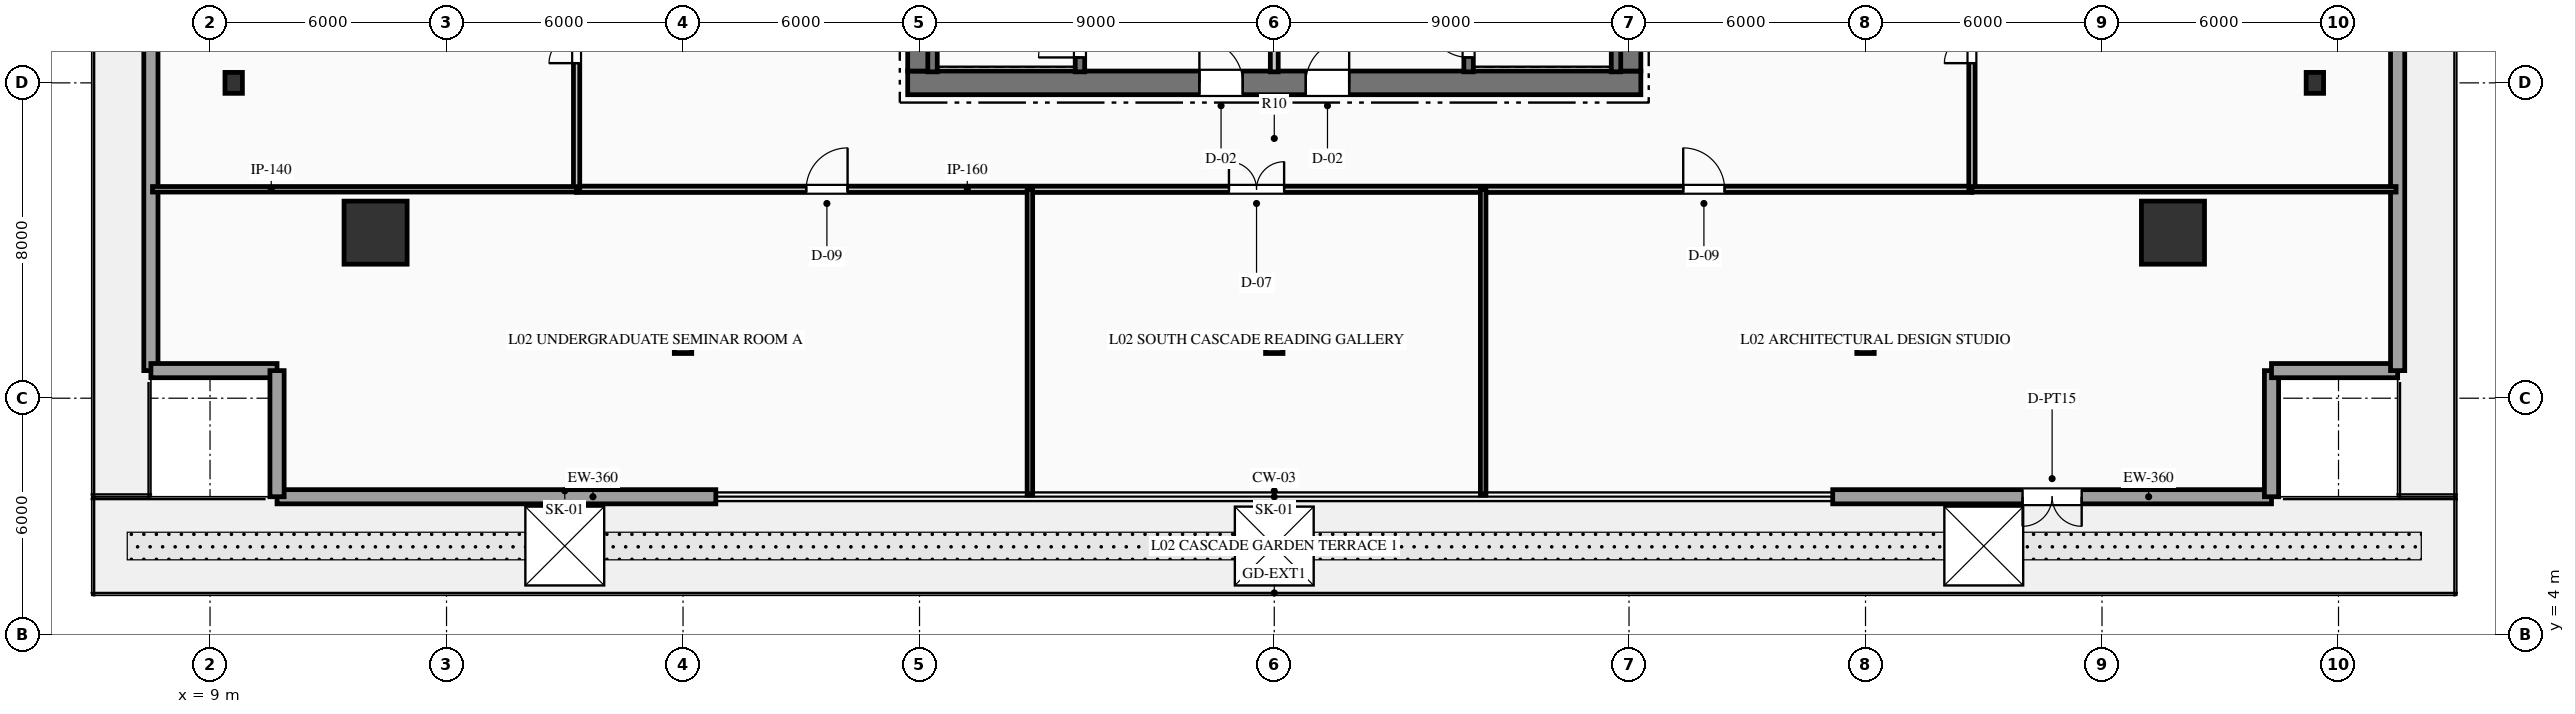
"""IFC4 building model, lengths in metres.
Left out: names, types, materials, properties, quantities, classifications, styles, units other than length and angle.
Written with IfcOpenShell. Run it as: python <this file> out.ifc"""

import sys

from ifc_helpers import new_model, si_unit, direction, frame, frame_2d, origin, origin_2d, place, context, subcontext, project, spatial, rectangle, hollow_rectangle, i_section, extrude, element, fill, save


model = new_model("IFC4")
c1 = context("Model", 3, precision=1e-05, world=origin(), true_north=direction((0.0, 1.0)))
c2 = subcontext(c1, "Body", "Model", "MODEL_VIEW")
j1 = project(units=[si_unit("LENGTHUNIT", "METRE"), si_unit("PLANEANGLEUNIT", "RADIAN")], contexts=[c1])
p1 = place(None, origin())
s1 = spatial("IfcSite", under=j1, at=p1, CompositionType="ELEMENT")
p2 = place(p1, origin())
s2 = spatial("IfcBuilding", under=s1, at=p2, CompositionType="ELEMENT")
p3 = place(p2, frame((0.0, 0.0, 11.4)))
s3 = spatial("IfcBuildingStorey", under=s2, at=p3, CompositionType="ELEMENT", Elevation=11.4)
p4 = place(p3, frame((26.7, 18.0, 0.0), z_axis=(0.0, 0.0, 1.0), x_axis=(1.0, 0.0, 0.0)))
e1 = element("IfcWall", 1, at=p4, inside=s3, PredefinedType="SHEAR", context=c2, shape_type="SweptSolid", body=[
    extrude(rectangle(XDim=18.6, YDim=0.6, at=frame_2d((9.3, 0.0))), origin(), (0.0, 0.0, 1.0), 5.4),
])
p5 = place(p4, frame((7.4, 0.0, 0.0)))
e2 = element("IfcOpeningElement", 2, at=p5, cuts=e1, PredefinedType="OPENING", context=c2, shape_type="SweptSolid", body=[
    extrude(rectangle(XDim=1.1, YDim=2.15, at=frame_2d((0.55, 1.075))), frame((0.0, 0.31, 0.0), z_axis=(0.0, -1.0, 0.0), x_axis=(1.0, 0.0, 0.0)), (0.0, 0.0, 1.0), 0.62),
])
p6 = place(p4, frame((10.1, 0.0, 0.0)))
e3 = element("IfcOpeningElement", 3, at=p6, cuts=e1, PredefinedType="OPENING", context=c2, shape_type="SweptSolid", body=[
    extrude(rectangle(XDim=1.1, YDim=2.15, at=frame_2d((0.55, 1.075))), frame((0.0, 0.31, 0.0), z_axis=(0.0, -1.0, 0.0), x_axis=(1.0, 0.0, 0.0)), (0.0, 0.0, 1.0), 0.62),
])
p7 = place(p3, frame((27.0, 18.3, 0.0), z_axis=(0.0, 0.0, 1.0), x_axis=(0.0, 1.0, 0.0)))
e4 = element("IfcWall", 4, at=p7, inside=s3, PredefinedType="SHEAR", context=c2, shape_type="SweptSolid", body=[
    extrude(rectangle(XDim=15.4, YDim=0.6, at=frame_2d((7.7, 0.0))), origin(), (0.0, 0.0, 1.0), 5.4),
])
p8 = place(p7, frame((9.94, 0.0, 0.0)))
e5 = element("IfcOpeningElement", 5, at=p8, cuts=e4, PredefinedType="OPENING", context=c2, shape_type="SweptSolid", body=[
    extrude(rectangle(XDim=1.4, YDim=2.2, at=frame_2d((0.7, 1.1))), frame((0.0, 0.31, 0.0), z_axis=(0.0, -1.0, 0.0), x_axis=(1.0, 0.0, 0.0)), (0.0, 0.0, 1.0), 0.62),
])
p9 = place(p3, frame((45.0, 18.3, 0.0), z_axis=(0.0, 0.0, 1.0), x_axis=(0.0, 1.0, 0.0)))
e6 = element("IfcWall", 6, at=p9, inside=s3, PredefinedType="SHEAR", context=c2, shape_type="SweptSolid", body=[
    extrude(rectangle(XDim=15.4, YDim=0.6, at=frame_2d((7.7, 0.0))), origin(), (0.0, 0.0, 1.0), 5.4),
])
p10 = place(p9, frame((9.94, 0.0, 0.0)))
e7 = element("IfcOpeningElement", 7, at=p10, cuts=e6, PredefinedType="OPENING", context=c2, shape_type="SweptSolid", body=[
    extrude(rectangle(XDim=1.4, YDim=2.2, at=frame_2d((0.7, 1.1))), frame((0.0, 0.31, 0.0), z_axis=(0.0, -1.0, 0.0), x_axis=(1.0, 0.0, 0.0)), (0.0, 0.0, 1.0), 0.62),
])
p11 = place(p3, frame((31.07, 18.28, 0.0), z_axis=(0.0, 0.0, 1.0), x_axis=(0.0, 1.0, 0.0)))
e8 = element("IfcWall", 8, at=p11, inside=s3, PredefinedType="SHEAR", context=c2, shape_type="SweptSolid", body=[
    extrude(rectangle(XDim=8.26, YDim=0.24, at=frame_2d((4.13, 0.0))), origin(), (0.0, 0.0, 1.0), 5.4),
])
p12 = place(p11, frame((0.365, 0.0, 0.0)))
e9 = element("IfcOpeningElement", 9, at=p12, cuts=e8, PredefinedType="OPENING", context=c2, shape_type="SweptSolid", body=[
    extrude(rectangle(XDim=1.05, YDim=2.15, at=frame_2d((0.525, 1.075))), frame((0.0, 0.13, 0.0), z_axis=(0.0, -1.0, 0.0), x_axis=(1.0, 0.0, 0.0)), (0.0, 0.0, 1.0), 0.26),
])
p13 = place(p3, frame((27.33, 18.28, 0.0), z_axis=(0.0, 0.0, 1.0), x_axis=(0.0, 1.0, 0.0)))
e10 = element("IfcWall", 10, at=p13, inside=s3, PredefinedType="SHEAR", context=c2, shape_type="SweptSolid", body=[
    extrude(rectangle(XDim=8.26, YDim=0.24, at=frame_2d((4.13, 0.0))), origin(), (0.0, 0.0, 1.0), 5.4),
])
p14 = place(p3, frame((40.93, 18.28, 0.0), z_axis=(0.0, 0.0, 1.0), x_axis=(0.0, 1.0, 0.0)))
e11 = element("IfcWall", 11, at=p14, inside=s3, PredefinedType="SHEAR", context=c2, shape_type="SweptSolid", body=[
    extrude(rectangle(XDim=8.26, YDim=0.24, at=frame_2d((4.13, 0.0))), origin(), (0.0, 0.0, 1.0), 5.4),
])
p15 = place(p14, frame((0.365, 0.0, 0.0)))
e12 = element("IfcOpeningElement", 12, at=p15, cuts=e11, PredefinedType="OPENING", context=c2, shape_type="SweptSolid", body=[
    extrude(rectangle(XDim=1.05, YDim=2.15, at=frame_2d((0.525, 1.075))), frame((0.0, 0.13, 0.0), z_axis=(0.0, -1.0, 0.0), x_axis=(1.0, 0.0, 0.0)), (0.0, 0.0, 1.0), 0.26),
])
p16 = place(p3, frame((44.67, 18.28, 0.0), z_axis=(0.0, 0.0, 1.0), x_axis=(0.0, 1.0, 0.0)))
e13 = element("IfcWall", 13, at=p16, inside=s3, PredefinedType="SHEAR", context=c2, shape_type="SweptSolid", body=[
    extrude(rectangle(XDim=8.26, YDim=0.24, at=frame_2d((4.13, 0.0))), origin(), (0.0, 0.0, 1.0), 5.4),
])
for number, where, z_axis, x_axis in (
    (14, (13.2, 14.2, 0.0), (0.0, 0.0, 1.0), (1.0, 0.0, 0.0)),
    (15, (58.8, 14.2, 0.0), (0.0, 0.0, 1.0), (1.0, 0.0, 0.0)),
):
    element("IfcColumn", number, at=place(p3, frame(where, z_axis=z_axis, x_axis=x_axis)), inside=s3, PredefinedType="COLUMN", context=c2, shape_type="SweptSolid", body=[
        extrude(hollow_rectangle(XDim=1.6, YDim=1.6, WallThickness=0.08, at=origin_2d()), origin(), (0.0, 0.0, 1.0), 5.4),
    ])
for number, where, z_axis, x_axis in (
    (16, (9.6, 18.0, 0.0), (0.0, 0.0, 1.0), (1.0, 0.0, 0.0)),
    (17, (62.4, 18.0, 0.0), (0.0, 0.0, 1.0), (1.0, 0.0, 0.0)),
    (18, (21.0, 11.4, 0.0), (0.0, 0.0, 1.0), (1.0, 0.0, 0.0)),
    (19, (51.0, 11.4, 0.0), (0.0, 0.0, 1.0), (1.0, 0.0, 0.0)),
    (20, (36.0, 11.4, 0.0), (0.0, 0.0, 1.0), (1.0, 0.0, 0.0)),
):
    element("IfcColumn", number, at=place(p3, frame(where, z_axis=z_axis, x_axis=x_axis)), inside=s3, PredefinedType="COLUMN", context=c2, shape_type="SweptSolid", body=[
        extrude(i_section(OverallWidth=0.442, OverallDepth=0.531, WebThickness=0.066, FlangeThickness=0.106, at=origin_2d()), origin(), (0.0, 0.0, 1.0), 5.4),
    ])
p17 = place(p3, frame((61.3, 7.5, 0.0), z_axis=(0.0, 0.0, 1.0), x_axis=(-1.0, 0.0, 0.0)))
e21 = element("IfcWall", 21, at=p17, inside=s3, PredefinedType="STANDARD", context=c2, shape_type="SweptSolid", body=[
    extrude(rectangle(XDim=11.132, YDim=0.36, at=frame_2d((5.566, 0.0))), origin(), (0.0, 0.0, 1.0), 5.07),
])
p18 = place(p17, frame((4.816, 0.0, 0.0)))
e22 = element("IfcOpeningElement", 22, at=p18, cuts=e21, PredefinedType="OPENING", context=c2, shape_type="SweptSolid", body=[
    extrude(rectangle(XDim=1.5, YDim=2.25, at=frame_2d((0.75, 1.125))), frame((0.0, 0.19, 0.0), z_axis=(0.0, -1.0, 0.0), x_axis=(1.0, 0.0, 0.0)), (0.0, 0.0, 1.0), 0.38),
])
p19 = place(p3, frame((21.832, 7.5, 0.0), z_axis=(0.0, 0.0, 1.0), x_axis=(-1.0, 0.0, 0.0)))
e23 = element("IfcWall", 23, at=p19, inside=s3, PredefinedType="STANDARD", context=c2, shape_type="SweptSolid", body=[
    extrude(rectangle(XDim=11.132, YDim=0.36, at=frame_2d((5.566, 0.0))), origin(), (0.0, 0.0, 1.0), 5.07),
])
for number, where, z_axis, x_axis in (
    (24, (61.3, 10.7, 0.0), (0.0, 0.0, 1.0), (0.0, -1.0, 0.0)),
    (25, (64.5, 10.7, 0.0), (0.0, 0.0, 1.0), (-1.0, 0.0, 0.0)),
):
    element("IfcWall", number, at=place(p3, frame(where, z_axis=z_axis, x_axis=x_axis)), inside=s3, PredefinedType="STANDARD", context=c2, shape_type="SweptSolid", body=[
        extrude(rectangle(XDim=3.2, YDim=0.36, at=frame_2d((1.6, 0.0))), origin(), (0.0, 0.0, 1.0), 5.07),
    ])
p20 = place(p3, frame((64.5, 43.8, 0.0), z_axis=(0.0, 0.0, 1.0), x_axis=(0.0, -1.0, 0.0)))
e26 = element("IfcWall", 26, at=p20, inside=s3, PredefinedType="STANDARD", context=c2, shape_type="SweptSolid", body=[
    extrude(rectangle(XDim=33.1, YDim=0.36, at=frame_2d((16.55, 0.0))), origin(), (0.0, 0.0, 1.0), 5.07),
])
p21 = place(p20, frame((17.05, 0.0, 0.0)))
e27 = element("IfcOpeningElement", 27, at=p21, cuts=e26, PredefinedType="OPENING", context=c2, shape_type="SweptSolid", body=[
    extrude(rectangle(XDim=1.5, YDim=2.25, at=frame_2d((0.75, 1.125))), frame((0.0, 0.19, 0.0), z_axis=(0.0, -1.0, 0.0), x_axis=(1.0, 0.0, 0.0)), (0.0, 0.0, 1.0), 0.38),
])
p22 = place(p20, frame((9.268, 0.0, 1.0)))
e28 = element("IfcOpeningElement", 28, at=p22, cuts=e26, PredefinedType="OPENING", context=c2, shape_type="SweptSolid", body=[
    extrude(rectangle(XDim=1.4, YDim=2.2, at=frame_2d((0.7, 1.1))), frame((0.0, 0.19, 0.0), z_axis=(0.0, -1.0, 0.0), x_axis=(1.0, 0.0, 0.0)), (0.0, 0.0, 1.0), 0.38),
])
p23 = place(p3, frame((7.5, 10.7, 0.0), z_axis=(0.0, 0.0, 1.0), x_axis=(0.0, 1.0, 0.0)))
e29 = element("IfcWall", 29, at=p23, inside=s3, PredefinedType="STANDARD", context=c2, shape_type="SweptSolid", body=[
    extrude(rectangle(XDim=33.1, YDim=0.36, at=frame_2d((16.55, 0.0))), origin(), (0.0, 0.0, 1.0), 5.07),
])
p24 = place(p23, frame((14.55, 0.0, 0.0)))
e30 = element("IfcOpeningElement", 30, at=p24, cuts=e29, PredefinedType="OPENING", context=c2, shape_type="SweptSolid", body=[
    extrude(rectangle(XDim=1.5, YDim=2.25, at=frame_2d((0.75, 1.125))), frame((0.0, 0.19, 0.0), z_axis=(0.0, -1.0, 0.0), x_axis=(1.0, 0.0, 0.0)), (0.0, 0.0, 1.0), 0.38),
])
p25 = place(p23, frame((9.268, 0.0, 1.0)))
e31 = element("IfcOpeningElement", 31, at=p25, cuts=e29, PredefinedType="OPENING", context=c2, shape_type="SweptSolid", body=[
    extrude(rectangle(XDim=1.4, YDim=2.2, at=frame_2d((0.7, 1.1))), frame((0.0, 0.19, 0.0), z_axis=(0.0, -1.0, 0.0), x_axis=(1.0, 0.0, 0.0)), (0.0, 0.0, 1.0), 0.38),
])
for number, where, z_axis, x_axis in (
    (32, (10.7, 10.7, 0.0), (0.0, 0.0, 1.0), (-1.0, 0.0, 0.0)),
    (33, (10.7, 7.5, 0.0), (0.0, 0.0, 1.0), (0.0, 1.0, 0.0)),
):
    element("IfcWall", number, at=place(p3, frame(where, z_axis=z_axis, x_axis=x_axis)), inside=s3, PredefinedType="STANDARD", context=c2, shape_type="SweptSolid", body=[
        extrude(rectangle(XDim=3.2, YDim=0.36, at=frame_2d((1.6, 0.0))), origin(), (0.0, 0.0, 1.0), 5.07),
    ])
p26 = place(p3, frame((36.0, 18.28, 0.0), z_axis=(0.0, 0.0, 1.0), x_axis=(0.0, 1.0, 0.0)))
e34 = element("IfcWall", 34, at=p26, inside=s3, PredefinedType="PARTITIONING", context=c2, shape_type="SweptSolid", body=[
    extrude(rectangle(XDim=3.77, YDim=0.2, at=frame_2d((1.885, 0.0))), origin(), (0.0, 0.0, 1.0), 5.07),
])
p27 = place(p3, frame((18.3, 15.3, 0.0), z_axis=(0.0, 0.0, 1.0), x_axis=(1.0, 0.0, 0.0)))
e35 = element("IfcWall", 35, at=p27, inside=s3, PredefinedType="PARTITIONING", context=c2, shape_type="SweptSolid", body=[
    extrude(rectangle(XDim=35.4, YDim=0.16, at=frame_2d((17.7, 0.0))), origin(), (0.0, 0.0, 1.0), 4.292),
])
p28 = place(p27, frame((5.825, 0.0, 0.0)))
e36 = element("IfcOpeningElement", 36, at=p28, cuts=e35, PredefinedType="OPENING", context=c2, shape_type="SweptSolid", body=[
    extrude(rectangle(XDim=1.05, YDim=2.15, at=frame_2d((0.525, 1.075))), frame((0.0, 0.09, 0.0), z_axis=(0.0, -1.0, 0.0), x_axis=(1.0, 0.0, 0.0)), (0.0, 0.0, 1.0), 0.18),
])
p29 = place(p27, frame((16.55, 0.0, 0.0)))
e37 = element("IfcOpeningElement", 37, at=p29, cuts=e35, PredefinedType="OPENING", context=c2, shape_type="SweptSolid", body=[
    extrude(rectangle(XDim=1.4, YDim=2.2, at=frame_2d((0.7, 1.1))), frame((0.0, 0.09, 0.0), z_axis=(0.0, -1.0, 0.0), x_axis=(1.0, 0.0, 0.0)), (0.0, 0.0, 1.0), 0.18),
])
p30 = place(p27, frame((28.075, 0.0, 0.0)))
e38 = element("IfcOpeningElement", 38, at=p30, cuts=e35, PredefinedType="OPENING", context=c2, shape_type="SweptSolid", body=[
    extrude(rectangle(XDim=1.05, YDim=2.15, at=frame_2d((0.525, 1.075))), frame((0.0, 0.09, 0.0), z_axis=(0.0, -1.0, 0.0), x_axis=(1.0, 0.0, 0.0)), (0.0, 0.0, 1.0), 0.18),
])
p31 = place(p3, frame((18.3, 15.3, 0.0), z_axis=(0.0, 0.0, 1.0), x_axis=(0.0, 1.0, 0.0)))
e39 = element("IfcWall", 39, at=p31, inside=s3, PredefinedType="PARTITIONING", context=c2, shape_type="SweptSolid", body=[
    extrude(rectangle(XDim=6.55, YDim=0.16, at=frame_2d((3.275, 0.0))), origin(), (0.0, 0.0, 1.0), 5.07),
])
p32 = place(p31, frame((3.2, 0.0, 0.0)))
e40 = element("IfcOpeningElement", 40, at=p32, cuts=e39, PredefinedType="OPENING", context=c2, shape_type="SweptSolid", body=[
    extrude(rectangle(XDim=1.4, YDim=2.2, at=frame_2d((0.7, 1.1))), frame((0.0, 0.09, 0.0), z_axis=(0.0, -1.0, 0.0), x_axis=(1.0, 0.0, 0.0)), (0.0, 0.0, 1.0), 0.18),
])
p33 = place(p3, frame((53.7, 15.3, 0.0), z_axis=(0.0, 0.0, 1.0), x_axis=(0.0, 1.0, 0.0)))
e41 = element("IfcWall", 41, at=p33, inside=s3, PredefinedType="PARTITIONING", context=c2, shape_type="SweptSolid", body=[
    extrude(rectangle(XDim=6.55, YDim=0.16, at=frame_2d((3.275, 0.0))), origin(), (0.0, 0.0, 1.0), 5.07),
])
p34 = place(p33, frame((3.2, 0.0, 0.0)))
e42 = element("IfcOpeningElement", 42, at=p34, cuts=e41, PredefinedType="OPENING", context=c2, shape_type="SweptSolid", body=[
    extrude(rectangle(XDim=1.4, YDim=2.2, at=frame_2d((0.7, 1.1))), frame((0.0, 0.09, 0.0), z_axis=(0.0, -1.0, 0.0), x_axis=(1.0, 0.0, 0.0)), (0.0, 0.0, 1.0), 0.18),
])
for number, where, z_axis, x_axis in (
    (43, (7.54, 15.3, 0.0), (0.0, 0.0, 1.0), (1.0, 0.0, 0.0)),
    (44, (53.7, 15.3, 0.0), (0.0, 0.0, 1.0), (1.0, 0.0, 0.0)),
):
    element("IfcWall", number, at=place(p3, frame(where, z_axis=z_axis, x_axis=x_axis)), inside=s3, PredefinedType="PARTITIONING", context=c2, shape_type="SweptSolid", body=[
        extrude(rectangle(XDim=10.76, YDim=0.14, at=frame_2d((5.38, 0.0))), origin(), (0.0, 0.0, 1.0), 4.292),
    ])
for number, where, z_axis, x_axis in (
    (45, (29.8, 7.54, 0.0), (0.0, 0.0, 1.0), (0.0, 1.0, 0.0)),
    (46, (41.3, 7.54, 0.0), (0.0, 0.0, 1.0), (0.0, 1.0, 0.0)),
):
    element("IfcWall", number, at=place(p3, frame(where, z_axis=z_axis, x_axis=x_axis)), inside=s3, PredefinedType="PARTITIONING", context=c2, shape_type="SweptSolid", body=[
        extrude(rectangle(XDim=7.76, YDim=0.14, at=frame_2d((3.88, 0.0))), origin(), (0.0, 0.0, 1.0), 5.07),
    ])
p35 = place(p18, origin())
e47 = element("IfcDoor", 47, at=p35, inside=s3, OperationType="DOUBLE_DOOR_SINGLE_SWING", PredefinedType="DOOR", context=c2, shape_type="SweptSolid", body=[
    extrude(rectangle(XDim=1.5, YDim=2.25, at=frame_2d((0.75, 1.125))), frame((0.0, 0.025, 0.0), z_axis=(0.0, -1.0, 0.0), x_axis=(1.0, 0.0, 0.0)), (0.0, 0.0, 1.0), 0.05),
])
fill(e22, e47)
p36 = place(p3, frame((0.0, 0.0, -0.25)))
p37 = place(p36, frame((18.0, 6.25, 0.2)))
e48 = element("IfcWindow", 48, at=p37, inside=s3, PartitioningType="SINGLE_PANEL", PredefinedType="SKYLIGHT", context=c2, shape_type="SweptSolid", body=[
    extrude(rectangle(XDim=2.0, YDim=2.0, at=origin_2d()), origin(), (0.0, 0.0, 1.0), 0.05),
])
p38 = place(p36, frame((36.0, 6.25, 0.2)))
e49 = element("IfcWindow", 49, at=p38, inside=s3, PartitioningType="SINGLE_PANEL", PredefinedType="SKYLIGHT", context=c2, shape_type="SweptSolid", body=[
    extrude(rectangle(XDim=2.0, YDim=2.0, at=origin_2d()), origin(), (0.0, 0.0, 1.0), 0.05),
])
p39 = place(p36, frame((54.0, 6.25, 0.2)))
e50 = element("IfcWindow", 50, at=p39, inside=s3, PartitioningType="SINGLE_PANEL", PredefinedType="SKYLIGHT", context=c2, shape_type="SweptSolid", body=[
    extrude(rectangle(XDim=2.0, YDim=2.0, at=origin_2d()), origin(), (0.0, 0.0, 1.0), 0.05),
])
p40 = place(p12, origin())
e51 = element("IfcDoor", 51, at=p40, inside=s3, OperationType="SINGLE_SWING_LEFT", PredefinedType="DOOR", context=c2, shape_type="SweptSolid", body=[
    extrude(rectangle(XDim=1.05, YDim=2.15, at=frame_2d((0.525, 1.075))), frame((0.0, 0.025, 0.0), z_axis=(0.0, -1.0, 0.0), x_axis=(1.0, 0.0, 0.0)), (0.0, 0.0, 1.0), 0.05),
])
fill(e9, e51)
p41 = place(p15, origin())
e52 = element("IfcDoor", 52, at=p41, inside=s3, OperationType="SINGLE_SWING_RIGHT", PredefinedType="DOOR", context=c2, shape_type="SweptSolid", body=[
    extrude(rectangle(XDim=1.05, YDim=2.15, at=frame_2d((0.525, 1.075))), frame((0.0, 0.025, 0.0), z_axis=(0.0, -1.0, 0.0), x_axis=(1.0, 0.0, 0.0)), (0.0, 0.0, 1.0), 0.05),
])
fill(e12, e52)
p42 = place(p5, origin())
e53 = element("IfcDoor", 53, at=p42, inside=s3, OperationType="SINGLE_SWING_LEFT", PredefinedType="DOOR", context=c2, shape_type="SweptSolid", body=[
    extrude(rectangle(XDim=1.1, YDim=2.15, at=frame_2d((0.55, 1.075))), frame((0.0, 0.025, 0.0), z_axis=(0.0, -1.0, 0.0), x_axis=(1.0, 0.0, 0.0)), (0.0, 0.0, 1.0), 0.05),
])
fill(e2, e53)
p43 = place(p6, origin())
e54 = element("IfcDoor", 54, at=p43, inside=s3, OperationType="SINGLE_SWING_RIGHT", PredefinedType="DOOR", context=c2, shape_type="SweptSolid", body=[
    extrude(rectangle(XDim=1.1, YDim=2.15, at=frame_2d((0.55, 1.075))), frame((0.0, 0.025, 0.0), z_axis=(0.0, -1.0, 0.0), x_axis=(1.0, 0.0, 0.0)), (0.0, 0.0, 1.0), 0.05),
])
fill(e3, e54)
p44 = place(p28, origin())
e55 = element("IfcDoor", 55, at=p44, inside=s3, OperationType="SINGLE_SWING_RIGHT", PredefinedType="DOOR", context=c2, shape_type="SweptSolid", body=[
    extrude(rectangle(XDim=1.05, YDim=2.15, at=frame_2d((0.525, 1.075))), frame((0.0, 0.025, 0.0), z_axis=(0.0, -1.0, 0.0), x_axis=(1.0, 0.0, 0.0)), (0.0, 0.0, 1.0), 0.05),
])
fill(e36, e55)
p45 = place(p29, origin())
e56 = element("IfcDoor", 56, at=p45, inside=s3, OperationType="DOUBLE_DOOR_SINGLE_SWING", PredefinedType="DOOR", context=c2, shape_type="SweptSolid", body=[
    extrude(rectangle(XDim=1.4, YDim=2.2, at=frame_2d((0.7, 1.1))), frame((0.0, 0.025, 0.0), z_axis=(0.0, -1.0, 0.0), x_axis=(1.0, 0.0, 0.0)), (0.0, 0.0, 1.0), 0.05),
])
fill(e37, e56)
p46 = place(p30, origin())
e57 = element("IfcDoor", 57, at=p46, inside=s3, OperationType="SINGLE_SWING_LEFT", PredefinedType="DOOR", context=c2, shape_type="SweptSolid", body=[
    extrude(rectangle(XDim=1.05, YDim=2.15, at=frame_2d((0.525, 1.075))), frame((0.0, 0.025, 0.0), z_axis=(0.0, -1.0, 0.0), x_axis=(1.0, 0.0, 0.0)), (0.0, 0.0, 1.0), 0.05),
])
fill(e38, e57)
p47 = place(p32, origin())
e58 = element("IfcDoor", 58, at=p47, inside=s3, OperationType="DOUBLE_DOOR_SINGLE_SWING", PredefinedType="DOOR", context=c2, shape_type="SweptSolid", body=[
    extrude(rectangle(XDim=1.4, YDim=2.2, at=frame_2d((0.7, 1.1))), frame((0.0, 0.025, 0.0), z_axis=(0.0, -1.0, 0.0), x_axis=(1.0, 0.0, 0.0)), (0.0, 0.0, 1.0), 0.05),
])
fill(e40, e58)
p48 = place(p34, origin())
e59 = element("IfcDoor", 59, at=p48, inside=s3, OperationType="DOUBLE_DOOR_SINGLE_SWING", PredefinedType="DOOR", context=c2, shape_type="SweptSolid", body=[
    extrude(rectangle(XDim=1.4, YDim=2.2, at=frame_2d((0.7, 1.1))), frame((0.0, 0.025, 0.0), z_axis=(0.0, -1.0, 0.0), x_axis=(1.0, 0.0, 0.0)), (0.0, 0.0, 1.0), 0.05),
])
fill(e42, e59)
save(model, sys.argv[1])
